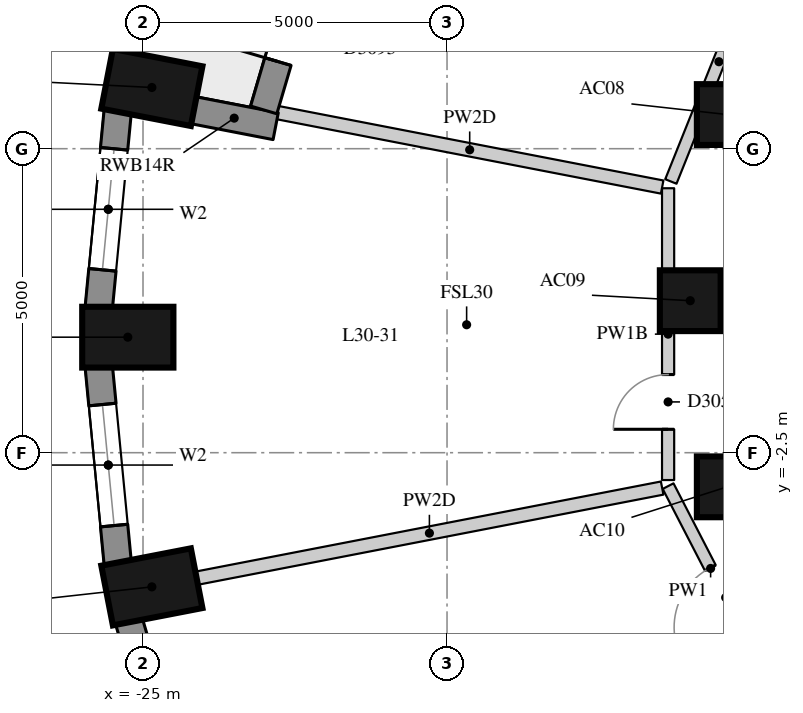
"""IFC4 building model, lengths in metres.
Left out: names, types, materials, properties, quantities, classifications, styles, units other than length and angle.
Written with IfcOpenShell. Run it as: python <this file> out.ifc"""

import sys

from ifc_helpers import new_model, si_unit, direction, frame, frame_2d, origin, origin_2d, place, context, subcontext, project, spatial, rectangle, extrude, element, fill, save


model = new_model("IFC4")
c1 = context("Model", 3, precision=1e-05, world=origin(), true_north=direction((0.0, 1.0)))
c2 = subcontext(c1, "Body", "Model", "MODEL_VIEW")
j1 = project(units=[si_unit("LENGTHUNIT", "METRE"), si_unit("PLANEANGLEUNIT", "RADIAN")], contexts=[c1])
p1 = place(None, origin())
s1 = spatial("IfcSite", under=j1, at=p1, CompositionType="ELEMENT")
p2 = place(p1, origin())
s2 = spatial("IfcBuilding", under=s1, at=p2, CompositionType="ELEMENT")
p3 = place(p2, frame((0.0, 0.0, 108.7)))
s3 = spatial("IfcBuildingStorey", under=s2, at=p3, CompositionType="ELEMENT", Elevation=108.7)
for number, where, z_axis, x_axis in (
    (1, (-24.854, 3.507, 0.0), (0.0, 0.0, 1.0), (-0.982, 0.19, 0.0)),
    (2, (-25.25, -0.6, 0.0), (0.0, 0.0, 1.0), (-1.0, 0.0, 0.0)),
    (3, (-24.854, -4.707, 0.0), (0.0, 0.0, 1.0), (-0.982, -0.19, 0.0)),
):
    element("IfcColumn", number, at=place(p3, frame(where, z_axis=z_axis, x_axis=x_axis)), inside=s3, PredefinedType="COLUMN", context=c2, shape_type="SweptSolid", body=[
        extrude(rectangle(XDim=1.5, YDim=1.0, at=origin_2d()), origin(), (0.0, 0.0, 1.0), 3.3),
    ])
for number, where, z_axis, x_axis in (
    (4, (-15.391, 3.062, 0.0), (0.0, 0.0, 1.0), (1.0, 0.0, 0.0)),
    (5, (-16.0, 0.0, 0.0), (0.0, 0.0, 1.0), (1.0, 0.0, 0.0)),
    (6, (-15.391, -3.062, 0.0), (0.0, 0.0, 1.0), (1.0, 0.0, 0.0)),
):
    element("IfcColumn", number, at=place(p3, frame(where, z_axis=z_axis, x_axis=x_axis)), inside=s3, PredefinedType="COLUMN", context=c2, shape_type="SweptSolid", body=[
        extrude(rectangle(XDim=1.0, YDim=1.0, at=origin_2d()), origin(), (0.0, 0.0, 1.0), 3.3),
    ])
p4 = place(p3, frame((-25.415, 3.126, 0.0), z_axis=(0.0, 0.0, 1.0), x_axis=(-0.095967726544, -0.995384446062, 0.0)))
e7 = element("IfcWall", 7, at=p4, inside=s3, PredefinedType="SOLIDWALL", context=c2, shape_type="SweptSolid", body=[
    extrude(rectangle(XDim=3.261, YDim=0.45, at=frame_2d((1.631, 0.0))), origin(), (0.0, 0.0, 1.0), 3.02),
])
p5 = place(p4, frame((0.631, 0.0, 0.4)))
e8 = element("IfcOpeningElement", 8, at=p5, cuts=e7, PredefinedType="OPENING", context=c2, shape_type="SweptSolid", body=[
    extrude(rectangle(XDim=2.0, YDim=1.75, at=frame_2d((1.0, 0.875))), frame((0.0, 0.235, 0.0), z_axis=(0.0, -1.0, 0.0), x_axis=(1.0, 0.0, 0.0)), (0.0, 0.0, 1.0), 0.47),
])
p6 = place(p3, frame((-25.728, -1.08, 0.0), z_axis=(0.0, 0.0, 1.0), x_axis=(0.095967726544, -0.995384446062, 0.0)))
e9 = element("IfcWall", 9, at=p6, inside=s3, PredefinedType="SOLIDWALL", context=c2, shape_type="SweptSolid", body=[
    extrude(rectangle(XDim=3.261, YDim=0.45, at=frame_2d((1.631, 0.0))), origin(), (0.0, 0.0, 1.0), 3.02),
])
p7 = place(p6, frame((0.631, 0.0, 0.4)))
e10 = element("IfcOpeningElement", 10, at=p7, cuts=e9, PredefinedType="OPENING", context=c2, shape_type="SweptSolid", body=[
    extrude(rectangle(XDim=2.0, YDim=1.75, at=frame_2d((1.0, 0.875))), frame((0.0, 0.235, 0.0), z_axis=(0.0, -1.0, 0.0), x_axis=(1.0, 0.0, 0.0)), (0.0, 0.0, 1.0), 0.47),
])
p8 = place(p3, frame((-25.232, -5.269, 0.0), z_axis=(0.0, 0.0, 1.0), x_axis=(0.283051078697, -0.959104836214, 0.0)))
e11 = element("IfcWall", 11, at=p8, inside=s3, PredefinedType="SOLIDWALL", context=c2, shape_type="SweptSolid", body=[
    extrude(rectangle(XDim=3.286, YDim=0.45, at=frame_2d((1.643, 0.0))), origin(), (0.0, 0.0, 1.0), 3.02),
])
p9 = place(p8, frame((0.643, 0.0, 0.4)))
e12 = element("IfcOpeningElement", 12, at=p9, cuts=e11, PredefinedType="OPENING", context=c2, shape_type="SweptSolid", body=[
    extrude(rectangle(XDim=2.0, YDim=1.75, at=frame_2d((1.0, 0.875))), frame((0.0, 0.235, 0.0), z_axis=(0.0, -1.0, 0.0), x_axis=(1.0, 0.0, 0.0)), (0.0, 0.0, 1.0), 0.47),
])
p10 = place(p3, frame((-24.183, 3.135, 0.0), z_axis=(0.0, 0.0, 1.0), x_axis=(0.981744955624, -0.190202108576, 0.0)))
e13 = element("IfcWall", 13, at=p10, inside=s3, PredefinedType="SOLIDWALL", context=c2, shape_type="SweptSolid", body=[
    extrude(rectangle(XDim=1.39, YDim=0.45, at=frame_2d((0.695, 0.0))), origin(), (0.0, 0.0, 1.0), 2.47),
])
p11 = place(p3, frame((-21.939, 6.791, 0.0), z_axis=(0.0, 0.0, 1.0), x_axis=(-0.282350284167, -0.959311376473, 0.0)))
e14 = element("IfcWall", 14, at=p11, inside=s3, PredefinedType="SOLIDWALL", context=c2, shape_type="SweptSolid", body=[
    extrude(rectangle(XDim=3.808, YDim=0.45, at=frame_2d((1.904, 0.0))), origin(), (0.0, 0.0, 1.0), 3.02),
])
p12 = place(p11, frame((0.829, 0.0, 0.4)))
e15 = element("IfcOpeningElement", 15, at=p12, cuts=e14, PredefinedType="OPENING", context=c2, shape_type="SweptSolid", body=[
    extrude(rectangle(XDim=1.0, YDim=1.75, at=frame_2d((0.5, 0.875))), frame((0.0, 0.235, 0.0), z_axis=(0.0, -1.0, 0.0), x_axis=(1.0, 0.0, 0.0)), (0.0, 0.0, 1.0), 0.47),
])
p13 = place(p11, frame((1.979, 0.0, 0.0)))
e16 = element("IfcOpeningElement", 16, at=p13, cuts=e14, PredefinedType="OPENING", context=c2, shape_type="SweptSolid", body=[
    extrude(rectangle(XDim=1.0, YDim=2.15, at=frame_2d((0.5, 1.075))), frame((0.0, 0.235, 0.0), z_axis=(0.0, -1.0, 0.0), x_axis=(1.0, 0.0, 0.0)), (0.0, 0.0, 1.0), 0.47),
])
p14 = place(p3, frame((-14.966, -5.757, 0.0), z_axis=(0.0, 0.0, 1.0), x_axis=(-0.458904116107, 0.888485797422, 0.0)))
e17 = element("IfcWall", 17, at=p14, inside=s3, PredefinedType="PARTITIONING", context=c2, shape_type="SweptSolid", body=[
    extrude(rectangle(XDim=3.047, YDim=0.2, at=frame_2d((1.524, 0.0))), origin(), (0.0, 0.0, 1.0), 3.02),
])
p15 = place(p14, frame((0.435, 0.0, 0.0)))
e18 = element("IfcOpeningElement", 18, at=p15, cuts=e17, PredefinedType="OPENING", context=c2, shape_type="SweptSolid", body=[
    extrude(rectangle(XDim=1.1, YDim=2.1, at=frame_2d((0.55, 1.05))), frame((0.0, 0.11, 0.0), z_axis=(0.0, -1.0, 0.0), x_axis=(1.0, 0.0, 0.0)), (0.0, 0.0, 1.0), 0.22),
])
p16 = place(p3, frame((-16.364, -2.95, 0.0), z_axis=(0.0, 0.0, 1.0), x_axis=(0.0, 1.0, 0.0)))
e19 = element("IfcWall", 19, at=p16, inside=s3, PredefinedType="PARTITIONING", context=c2, shape_type="SweptSolid", body=[
    extrude(rectangle(XDim=4.799, YDim=0.2, at=frame_2d((2.4, 0.0))), origin(), (0.0, 0.0, 1.0), 2.52),
])
p17 = place(p16, frame((0.835, 0.0, 0.0)))
e20 = element("IfcOpeningElement", 20, at=p17, cuts=e19, PredefinedType="OPENING", context=c2, shape_type="SweptSolid", body=[
    extrude(rectangle(XDim=0.9, YDim=2.1, at=frame_2d((0.45, 1.05))), frame((0.0, 0.11, 0.0), z_axis=(0.0, -1.0, 0.0), x_axis=(1.0, 0.0, 0.0)), (0.0, 0.0, 1.0), 0.22),
])
p18 = place(p3, frame((-16.319, 1.961, 0.0), z_axis=(0.0, 0.0, 1.0), x_axis=(0.372352515432, 0.928091377102, 0.0)))
e21 = element("IfcWall", 21, at=p18, inside=s3, PredefinedType="PARTITIONING", context=c2, shape_type="SweptSolid", body=[
    extrude(rectangle(XDim=4.244, YDim=0.2, at=frame_2d((2.122, 0.0))), origin(), (0.0, 0.0, 1.0), 3.02),
])
p19 = place(p18, frame((2.481, 0.0, 0.0)))
e22 = element("IfcOpeningElement", 22, at=p19, cuts=e21, PredefinedType="OPENING", context=c2, shape_type="SweptSolid", body=[
    extrude(rectangle(XDim=1.1, YDim=2.1, at=frame_2d((0.55, 1.05))), frame((0.0, 0.11, 0.0), z_axis=(0.0, -1.0, 0.0), x_axis=(1.0, 0.0, 0.0)), (0.0, 0.0, 1.0), 0.22),
])
p20 = place(p3, frame((-22.793, 3.095, 0.0), z_axis=(0.0, 0.0, 1.0), x_axis=(0.981772102901, -0.190061931918, 0.0)))
e23 = element("IfcWall", 23, at=p20, inside=s3, PredefinedType="PARTITIONING", context=c2, shape_type="SweptSolid", body=[
    extrude(rectangle(XDim=6.448, YDim=0.22, at=frame_2d((3.224, 0.0))), origin(), (0.0, 0.0, 1.0), 2.47),
])
p21 = place(p3, frame((-24.118, -4.564, 0.0), z_axis=(0.0, 0.0, 1.0), x_axis=(0.981765151757, 0.190097834799, 0.0)))
e24 = element("IfcWall", 24, at=p21, inside=s3, PredefinedType="PARTITIONING", context=c2, shape_type="SweptSolid", body=[
    extrude(rectangle(XDim=7.798, YDim=0.22, at=frame_2d((3.899, 0.0))), origin(), (0.0, 0.0, 1.0), 2.47),
])
p22 = place(p5, origin())
e25 = element("IfcWindow", 25, at=p22, inside=s3, PartitioningType="SINGLE_PANEL", PredefinedType="WINDOW", context=c2, shape_type="SweptSolid", body=[
    extrude(rectangle(XDim=2.0, YDim=1.75, at=frame_2d((1.0, 0.875))), frame((0.0, 0.035, 0.0), z_axis=(0.0, -1.0, 0.0), x_axis=(1.0, 0.0, 0.0)), (0.0, 0.0, 1.0), 0.06),
])
fill(e8, e25)
p23 = place(p7, origin())
e26 = element("IfcWindow", 26, at=p23, inside=s3, PartitioningType="SINGLE_PANEL", PredefinedType="WINDOW", context=c2, shape_type="SweptSolid", body=[
    extrude(rectangle(XDim=2.0, YDim=1.75, at=frame_2d((1.0, 0.875))), frame((0.0, 0.035, 0.0), z_axis=(0.0, -1.0, 0.0), x_axis=(1.0, 0.0, 0.0)), (0.0, 0.0, 1.0), 0.06),
])
fill(e10, e26)
p24 = place(p13, frame((1.0, 0.0, 0.0), z_axis=(0.0, 0.0, 1.0), x_axis=(-1.0, 0.0, 0.0)))
e27 = element("IfcDoor", 27, at=p24, inside=s3, OperationType="SINGLE_SWING_LEFT", PredefinedType="DOOR", context=c2, shape_type="SweptSolid", body=[
    extrude(rectangle(XDim=1.0, YDim=2.15, at=frame_2d((0.5, 1.075))), frame((0.0, 0.075, 0.0), z_axis=(0.0, -1.0, 0.0), x_axis=(1.0, 0.0, 0.0)), (0.0, 0.0, 1.0), 0.05),
])
fill(e16, e27)
p25 = place(p17, origin())
e28 = element("IfcDoor", 28, at=p25, inside=s3, OperationType="SINGLE_SWING_LEFT", PredefinedType="DOOR", context=c2, shape_type="SweptSolid", body=[
    extrude(rectangle(XDim=0.9, YDim=2.1, at=frame_2d((0.45, 1.05))), frame((0.0, 0.025, 0.0), z_axis=(0.0, -1.0, 0.0), x_axis=(1.0, 0.0, 0.0)), (0.0, 0.0, 1.0), 0.05),
])
fill(e20, e28)
p26 = place(p15, origin())
e29 = element("IfcDoor", 29, at=p26, inside=s3, OperationType="SINGLE_SWING_LEFT", PredefinedType="DOOR", context=c2, shape_type="SweptSolid", body=[
    extrude(rectangle(XDim=1.1, YDim=2.1, at=frame_2d((0.55, 1.05))), frame((0.0, 0.025, 0.0), z_axis=(0.0, -1.0, 0.0), x_axis=(1.0, 0.0, 0.0)), (0.0, 0.0, 1.0), 0.05),
])
fill(e18, e29)
save(model, sys.argv[1])
